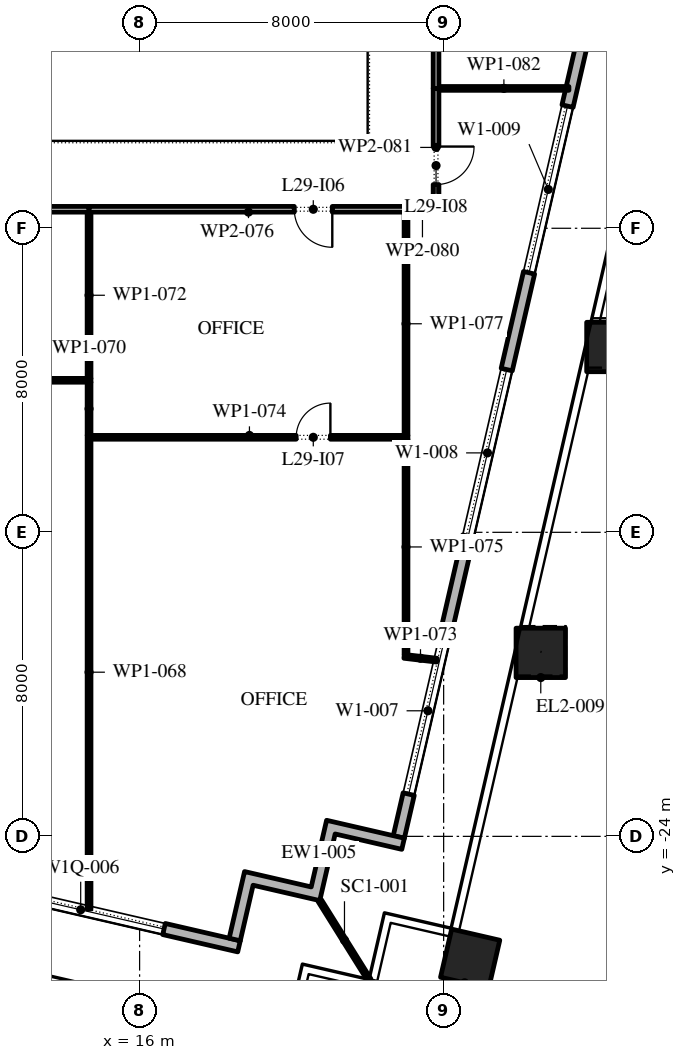
"""IFC4 building model, lengths in metres.
Left out: names, types, materials, properties, quantities, classifications, styles, units other than length and angle.
Written with IfcOpenShell. Run it as: python <this file> out.ifc"""

import sys

from ifc_helpers import new_model, si_unit, direction, frame, frame_2d, origin, origin_2d, place, context, subcontext, project, spatial, polyline, rectangle, outline, extrude, element, fill, save


model = new_model("IFC4")
c1 = context("Model", 3, precision=1e-05, world=origin(), true_north=direction((0.0, 1.0)))
c2 = subcontext(c1, "Body", "Model", "MODEL_VIEW")
j1 = project(units=[si_unit("LENGTHUNIT", "METRE"), si_unit("PLANEANGLEUNIT", "RADIAN")], contexts=[c1])
p1 = place(None, origin())
s1 = spatial("IfcSite", under=j1, at=p1, CompositionType="ELEMENT")
p2 = place(p1, origin())
s2 = spatial("IfcBuilding", under=s1, at=p2, CompositionType="ELEMENT")
p3 = place(p2, frame((0.0, 0.0, 135.0)))
s3 = spatial("IfcBuildingStorey", under=s2, at=p3, CompositionType="ELEMENT", Elevation=135.0)
p4 = place(p3, frame((24.698, -27.22, 0.0), z_axis=(0.0, 0.0, 1.0), x_axis=(0.974370064785, -0.224951054344, 0.0)))
e1 = element("IfcColumn", 1, at=p4, inside=s3, PredefinedType="COLUMN", context=c2, shape_type="SweptSolid", body=[
    extrude(rectangle(XDim=1.3, YDim=1.3, at=origin_2d()), origin(), (0.0, 0.0, 1.0), 4.2),
])
p5 = place(p3, frame((26.556, -19.172, 0.0), z_axis=(0.002964348167, 0.012671135303, 0.9999153239), x_axis=(-0.973709261374, 0.227794368487, 0.0)))
e2 = element("IfcColumn", 2, at=p5, inside=s3, PredefinedType="COLUMN", context=c2, shape_type="SweptSolid", body=[
    extrude(rectangle(XDim=1.3, YDim=1.3, at=origin_2d()), origin(), (0.0, 0.0, 1.0), 4.2),
])
p6 = place(p3, frame((28.414, -11.124, 0.0), z_axis=(0.005810983994, 0.025277780376, 0.999663576552), x_axis=(-0.974579651079, 0.224041299099, 0.0)))
e3 = element("IfcColumn", 3, at=p6, inside=s3, PredefinedType="COLUMN", context=c2, shape_type="SweptSolid", body=[
    extrude(rectangle(XDim=1.3, YDim=1.3, at=origin_2d()), origin(), (0.0, 0.0, 1.0), 4.201),
])
p7 = place(p3, frame((22.539, -28.569, 0.0), z_axis=(0.0, 0.0, 1.0), x_axis=(0.974370064785, -0.224951054344, 0.0)))
e4 = element("IfcColumn", 4, at=p7, inside=s3, PredefinedType="COLUMN", context=c2, shape_type="SweptSolid", body=[
    extrude(rectangle(XDim=1.3, YDim=1.3, at=origin_2d()), origin(), (0.0, 0.0, 1.0), 4.2),
])
p8 = place(p3, frame((-31.078, -15.421, 0.0), z_axis=(0.0, 0.0, 1.0), x_axis=(0.974370456532, -0.224949357493, 0.0)))
e5 = element("IfcWall", 5, at=p8, inside=s3, PredefinedType="STANDARD", context=c2, shape_type="SweptSolid", body=[
    extrude(rectangle(XDim=51.0, YDim=0.3, at=frame_2d((25.5, 0.0))), origin(), (0.0, 0.0, 1.0), 4.0),
])
p9 = place(p8, frame((1.875, 0.0, 0.45)))
e6 = element("IfcOpeningElement", 6, at=p9, cuts=e5, PredefinedType="OPENING", context=c2, shape_type="SweptSolid", body=[
    extrude(rectangle(XDim=4.5, YDim=2.575, at=frame_2d((2.25, 1.288))), frame((0.0, 0.16, 0.0), z_axis=(0.0, -1.0, 0.0), x_axis=(1.0, 0.0, 0.0)), (0.0, 0.0, 1.0), 0.32),
])
p10 = place(p8, frame((10.275, 0.0, 0.45)))
e7 = element("IfcOpeningElement", 7, at=p10, cuts=e5, PredefinedType="OPENING", context=c2, shape_type="SweptSolid", body=[
    extrude(rectangle(XDim=4.5, YDim=2.525, at=frame_2d((2.25, 1.262))), frame((0.0, 0.16, 0.0), z_axis=(0.0, -1.0, 0.0), x_axis=(1.0, 0.0, 0.0)), (0.0, 0.0, 1.0), 0.32),
])
p11 = place(p8, frame((18.825, 0.0, 0.45)))
e8 = element("IfcOpeningElement", 8, at=p11, cuts=e5, PredefinedType="OPENING", context=c2, shape_type="SweptSolid", body=[
    extrude(rectangle(XDim=4.5, YDim=2.5, at=frame_2d((2.25, 1.25))), frame((0.0, 0.16, 0.0), z_axis=(0.0, -1.0, 0.0), x_axis=(1.0, 0.0, 0.0)), (0.0, 0.0, 1.0), 0.32),
])
p12 = place(p8, frame((28.425, 0.0, 0.0)))
e9 = element("IfcOpeningElement", 9, at=p12, cuts=e5, PredefinedType="OPENING", context=c2, shape_type="SweptSolid", body=[
    extrude(rectangle(XDim=2.4, YDim=2.9, at=frame_2d((1.2, 1.45))), frame((0.0, 0.16, 0.0), z_axis=(0.0, -1.0, 0.0), x_axis=(1.0, 0.0, 0.0)), (0.0, 0.0, 1.0), 0.32),
])
p13 = place(p8, frame((35.925, 0.0, 0.45)))
e10 = element("IfcOpeningElement", 10, at=p13, cuts=e5, PredefinedType="OPENING", context=c2, shape_type="SweptSolid", body=[
    extrude(rectangle(XDim=4.5, YDim=2.45, at=frame_2d((2.25, 1.225))), frame((0.0, 0.16, 0.0), z_axis=(0.0, -1.0, 0.0), x_axis=(1.0, 0.0, 0.0)), (0.0, 0.0, 1.0), 0.32),
])
p14 = place(p8, frame((44.475, 0.0, 0.45)))
e11 = element("IfcOpeningElement", 11, at=p14, cuts=e5, PredefinedType="OPENING", context=c2, shape_type="SweptSolid", body=[
    extrude(rectangle(XDim=4.5, YDim=2.45, at=frame_2d((2.25, 1.225))), frame((0.0, 0.16, 0.0), z_axis=(0.0, -1.0, 0.0), x_axis=(1.0, 0.0, 0.0)), (0.0, 0.0, 1.0), 0.32),
])
p15 = place(p3, frame((22.82, -24.016, 0.0), z_axis=(0.0, 0.0, 1.0), x_axis=(0.224953880882, 0.974369412223, 0.0)))
e12 = element("IfcWall", 12, at=p15, inside=s3, PredefinedType="STANDARD", context=c2, shape_type="SweptSolid", body=[
    extrude(rectangle(XDim=49.5, YDim=0.3, at=frame_2d((24.75, 0.0))), origin(), (0.0, 0.0, 1.0), 4.0),
])
p16 = place(p15, frame((1.157, 0.0, 0.45)))
e13 = element("IfcOpeningElement", 13, at=p16, cuts=e12, PredefinedType="OPENING", context=c2, shape_type="SweptSolid", body=[
    extrude(rectangle(XDim=4.5, YDim=3.05, at=frame_2d((2.25, 1.525))), frame((0.0, 0.16, 0.0), z_axis=(0.0, -1.0, 0.0), x_axis=(1.0, 0.0, 0.0)), (0.0, 0.0, 1.0), 0.32),
])
p17 = place(p15, frame((8.121, 0.0, 0.45)))
e14 = element("IfcOpeningElement", 14, at=p17, cuts=e12, PredefinedType="OPENING", context=c2, shape_type="SweptSolid", body=[
    extrude(rectangle(XDim=4.5, YDim=3.05, at=frame_2d((2.25, 1.525))), frame((0.0, 0.16, 0.0), z_axis=(0.0, -1.0, 0.0), x_axis=(1.0, 0.0, 0.0)), (0.0, 0.0, 1.0), 0.32),
])
p18 = place(p15, frame((15.236, 0.0, 0.45)))
e15 = element("IfcOpeningElement", 15, at=p18, cuts=e12, PredefinedType="OPENING", context=c2, shape_type="SweptSolid", body=[
    extrude(rectangle(XDim=4.5, YDim=3.05, at=frame_2d((2.25, 1.525))), frame((0.0, 0.16, 0.0), z_axis=(0.0, -1.0, 0.0), x_axis=(1.0, 0.0, 0.0)), (0.0, 0.0, 1.0), 0.32),
])
p19 = place(p15, frame((23.4, 0.0, 0.0)))
e16 = element("IfcOpeningElement", 16, at=p19, cuts=e12, PredefinedType="OPENING", context=c2, shape_type="SweptSolid", body=[
    extrude(rectangle(XDim=2.4, YDim=3.5, at=frame_2d((1.2, 1.75))), frame((0.0, 0.16, 0.0), z_axis=(0.0, -1.0, 0.0), x_axis=(1.0, 0.0, 0.0)), (0.0, 0.0, 1.0), 0.32),
])
p20 = place(p15, frame((29.464, 0.0, 0.45)))
e17 = element("IfcOpeningElement", 17, at=p20, cuts=e12, PredefinedType="OPENING", context=c2, shape_type="SweptSolid", body=[
    extrude(rectangle(XDim=4.5, YDim=2.875, at=frame_2d((2.25, 1.438))), frame((0.0, 0.16, 0.0), z_axis=(0.0, -1.0, 0.0), x_axis=(1.0, 0.0, 0.0)), (0.0, 0.0, 1.0), 0.32),
])
p21 = place(p15, frame((36.579, 0.0, 0.45)))
e18 = element("IfcOpeningElement", 18, at=p21, cuts=e12, PredefinedType="OPENING", context=c2, shape_type="SweptSolid", body=[
    extrude(rectangle(XDim=4.5, YDim=2.825, at=frame_2d((2.25, 1.413))), frame((0.0, 0.16, 0.0), z_axis=(0.0, -1.0, 0.0), x_axis=(1.0, 0.0, 0.0)), (0.0, 0.0, 1.0), 0.32),
])
p22 = place(p15, frame((43.693, 0.0, 0.45)))
e19 = element("IfcOpeningElement", 19, at=p22, cuts=e12, PredefinedType="OPENING", context=c2, shape_type="SweptSolid", body=[
    extrude(rectangle(XDim=4.5, YDim=2.75, at=frame_2d((2.25, 1.375))), frame((0.0, 0.16, 0.0), z_axis=(0.0, -1.0, 0.0), x_axis=(1.0, 0.0, 0.0)), (0.0, 0.0, 1.0), 0.32),
])
p23 = place(p3, origin())
e20 = element("IfcWall", 20, at=p23, inside=s3, PredefinedType="STANDARD", context=c2, shape_type="SweptSolid", body=[
    extrude(outline(polyline([(20.515, -25.331), (20.92, -23.577), (22.967, -24.049), (22.899, -24.342), (21.145, -23.937), (20.74, -25.691), (18.986, -25.286), (18.649, -26.747), (18.357, -26.68), (18.762, -24.926), (20.515, -25.331)])), origin(), (0.0, 0.0, 1.0), 4.0),
])
p24 = place(p3, frame((20.74, -25.691, -0.05), z_axis=(0.0, 0.0, 1.0), x_axis=(0.529972121605, -0.848015064914, 0.0)))
e21 = element("IfcWall", 21, at=p24, inside=s3, PredefinedType="STANDARD", context=c2, shape_type="SweptSolid", body=[
    extrude(rectangle(XDim=2.455, YDim=0.1, at=frame_2d((1.228, 0.0))), origin(), (0.0, 0.0, 1.0), 4.05),
])
p25 = place(p3, frame((14.67, -13.45, 0.0), z_axis=(0.0, 0.0, 1.0), x_axis=(0.0, -1.0, 0.0)))
e22 = element("IfcWall", 22, at=p25, inside=s3, PredefinedType="PARTITIONING", context=c2, shape_type="SweptSolid", body=[
    extrude(rectangle(XDim=12.461, YDim=0.1, at=frame_2d((6.23, 0.0))), origin(), (0.0, 0.0, 1.0), 4.0),
])
p26 = place(p3, frame((14.72, -12.0, 0.0), z_axis=(0.0, 0.0, 1.0), x_axis=(-1.0, 0.0, 0.0)))
e23 = element("IfcWall", 23, at=p26, inside=s3, PredefinedType="PARTITIONING", context=c2, shape_type="SweptSolid", body=[
    extrude(rectangle(XDim=12.68, YDim=0.1, at=frame_2d((6.34, 0.0))), origin(), (0.0, 0.0, 1.0), 4.0),
])
p27 = place(p26, frame((5.88, 0.0, 0.0)))
e24 = element("IfcOpeningElement", 24, at=p27, cuts=e23, PredefinedType="OPENING", context=c2, shape_type="SweptSolid", body=[
    extrude(rectangle(XDim=0.9, YDim=2.1, at=frame_2d((0.45, 1.05))), frame((0.0, 0.06, 0.0), z_axis=(0.0, -1.0, 0.0), x_axis=(1.0, 0.0, 0.0)), (0.0, 0.0, 1.0), 0.12),
])
p28 = place(p3, frame((14.67, -12.05, 0.0), z_axis=(0.0, 0.0, 1.0), x_axis=(0.0, -1.0, 0.0)))
e25 = element("IfcWall", 25, at=p28, inside=s3, PredefinedType="PARTITIONING", context=c2, shape_type="SweptSolid", body=[
    extrude(rectangle(XDim=1.4, YDim=0.1, at=frame_2d((0.7, 0.0))), origin(), (0.0, 0.0, 1.0), 4.0),
])
p29 = place(p3, frame((14.67, -7.5, 0.0), z_axis=(0.0, 0.0, 1.0), x_axis=(-1.0, 0.0, 0.0)))
e26 = element("IfcWall", 26, at=p29, inside=s3, PredefinedType="PARTITIONING", context=c2, shape_type="SweptSolid", body=[
    extrude(rectangle(XDim=6.395, YDim=0.15, at=frame_2d((3.198, 0.0))), origin(), (0.0, 0.0, 1.0), 4.0),
])
p30 = place(p29, frame((2.82, 0.0, 0.0)))
e27 = element("IfcOpeningElement", 27, at=p30, cuts=e26, PredefinedType="OPENING", context=c2, shape_type="SweptSolid", body=[
    extrude(rectangle(XDim=1.0, YDim=2.1, at=frame_2d((0.5, 1.05))), frame((0.0, 0.085, 0.0), z_axis=(0.0, -1.0, 0.0), x_axis=(1.0, 0.0, 0.0)), (0.0, 0.0, 1.0), 0.17),
])
p31 = place(p3, frame((14.67, -7.575, 0.0), z_axis=(0.0, 0.0, 1.0), x_axis=(0.0, -1.0, 0.0)))
e28 = element("IfcWall", 28, at=p31, inside=s3, PredefinedType="PARTITIONING", context=c2, shape_type="SweptSolid", body=[
    extrude(rectangle(XDim=4.375, YDim=0.1, at=frame_2d((2.188, 0.0))), origin(), (0.0, 0.0, 1.0), 4.0),
])
p32 = place(p3, frame((22.96, -19.264, 0.0), z_axis=(0.0, 0.0, 1.0), x_axis=(0.993326131588, -0.115339482852, 0.0)))
e29 = element("IfcWall", 29, at=p32, inside=s3, PredefinedType="PARTITIONING", context=c2, shape_type="SweptSolid", body=[
    extrude(rectangle(XDim=0.868, YDim=0.1, at=frame_2d((0.434, 0.0))), origin(), (0.0, 0.0, 1.0), 4.0),
])
p33 = place(p3, frame((23.06, -13.5, 0.0), z_axis=(0.0, 0.0, 1.0), x_axis=(-1.0, 0.0, 0.0)))
e30 = element("IfcWall", 30, at=p33, inside=s3, PredefinedType="PARTITIONING", context=c2, shape_type="SweptSolid", body=[
    extrude(rectangle(XDim=8.34, YDim=0.1, at=frame_2d((4.17, 0.0))), origin(), (0.0, 0.0, 1.0), 4.0),
])
p34 = place(p33, frame((2.04, 0.0, 0.0)))
e31 = element("IfcOpeningElement", 31, at=p34, cuts=e30, PredefinedType="OPENING", context=c2, shape_type="SweptSolid", body=[
    extrude(rectangle(XDim=0.9, YDim=2.1, at=frame_2d((0.45, 1.05))), frame((0.0, 0.06, 0.0), z_axis=(0.0, -1.0, 0.0), x_axis=(1.0, 0.0, 0.0)), (0.0, 0.0, 1.0), 0.12),
])
p35 = place(p3, frame((23.01, -13.55, 0.0), z_axis=(0.0, 0.0, 1.0), x_axis=(0.0, -1.0, 0.0)))
e32 = element("IfcWall", 32, at=p35, inside=s3, PredefinedType="PARTITIONING", context=c2, shape_type="SweptSolid", body=[
    extrude(rectangle(XDim=5.67, YDim=0.1, at=frame_2d((2.835, 0.0))), origin(), (0.0, 0.0, 1.0), 4.0),
])
p36 = place(p3, frame((23.06, -7.5, 0.0), z_axis=(0.0, 0.0, 1.0), x_axis=(-1.0, 0.0, 0.0)))
e33 = element("IfcWall", 33, at=p36, inside=s3, PredefinedType="PARTITIONING", context=c2, shape_type="SweptSolid", body=[
    extrude(rectangle(XDim=8.39, YDim=0.15, at=frame_2d((4.195, 0.0))), origin(), (0.0, 0.0, 1.0), 4.0),
])
p37 = place(p36, frame((1.99, 0.0, 0.0)))
e34 = element("IfcOpeningElement", 34, at=p37, cuts=e33, PredefinedType="OPENING", context=c2, shape_type="SweptSolid", body=[
    extrude(rectangle(XDim=1.0, YDim=2.1, at=frame_2d((0.5, 1.05))), frame((0.0, 0.085, 0.0), z_axis=(0.0, -1.0, 0.0), x_axis=(1.0, 0.0, 0.0)), (0.0, 0.0, 1.0), 0.17),
])
p38 = place(p3, frame((23.01, -7.575, 0.0), z_axis=(0.0, 0.0, 1.0), x_axis=(0.0, -1.0, 0.0)))
e35 = element("IfcWall", 35, at=p38, inside=s3, PredefinedType="PARTITIONING", context=c2, shape_type="SweptSolid", body=[
    extrude(rectangle(XDim=5.875, YDim=0.1, at=frame_2d((2.938, 0.0))), origin(), (0.0, 0.0, 1.0), 4.0),
])
p39 = place(p3, frame((23.875, -7.5, 0.0), z_axis=(0.0, 0.0, 1.0), x_axis=(-1.0, 0.0, 0.0)))
e36 = element("IfcWall", 36, at=p39, inside=s3, PredefinedType="PARTITIONING", context=c2, shape_type="SweptSolid", body=[
    extrude(rectangle(XDim=0.865, YDim=0.15, at=frame_2d((0.433, 0.0))), origin(), (0.0, 0.0, 1.0), 4.0),
])
p40 = place(p3, frame((23.8, -4.32, 0.0), z_axis=(0.0, 0.0, 1.0), x_axis=(0.0, -1.0, 0.0)))
e37 = element("IfcWall", 37, at=p40, inside=s3, PredefinedType="PARTITIONING", context=c2, shape_type="SweptSolid", body=[
    extrude(rectangle(XDim=3.105, YDim=0.15, at=frame_2d((1.552, 0.0))), origin(), (0.0, 0.0, 1.0), 4.0),
])
p41 = place(p40, frame((1.53, 0.0, 0.0)))
e38 = element("IfcOpeningElement", 38, at=p41, cuts=e37, PredefinedType="OPENING", context=c2, shape_type="SweptSolid", body=[
    extrude(rectangle(XDim=1.0, YDim=2.1, at=frame_2d((0.5, 1.05))), frame((0.0, 0.085, 0.0), z_axis=(0.0, -1.0, 0.0), x_axis=(1.0, 0.0, 0.0)), (0.0, 0.0, 1.0), 0.17),
])
p42 = place(p3, frame((23.875, -4.32, 0.0), z_axis=(0.0, 0.0, 1.0), x_axis=(1.0, 0.0, 0.0)))
e39 = element("IfcWall", 39, at=p42, inside=s3, PredefinedType="PARTITIONING", context=c2, shape_type="SweptSolid", body=[
    extrude(rectangle(XDim=3.421, YDim=0.1, at=frame_2d((1.71, 0.0))), origin(), (0.0, 0.0, 1.0), 4.0),
])
p43 = place(p3, frame((23.8, 10.44, 0.0), z_axis=(0.0, 0.0, 1.0), x_axis=(0.0, -1.0, 0.0)))
e40 = element("IfcWall", 40, at=p43, inside=s3, PredefinedType="PARTITIONING", context=c2, shape_type="SweptSolid", body=[
    extrude(rectangle(XDim=14.76, YDim=0.15, at=frame_2d((7.38, 0.0))), origin(), (0.0, 0.0, 1.0), 4.0),
])
p44 = place(p43, frame((9.86, 0.0, 0.0)))
e41 = element("IfcOpeningElement", 41, at=p44, cuts=e40, PredefinedType="OPENING", context=c2, shape_type="SweptSolid", body=[
    extrude(rectangle(XDim=1.0, YDim=2.1, at=frame_2d((0.5, 1.05))), frame((0.0, 0.085, 0.0), z_axis=(0.0, -1.0, 0.0), x_axis=(1.0, 0.0, 0.0)), (0.0, 0.0, 1.0), 0.17),
])
p45 = place(p14, origin())
e42 = element("IfcWindow", 42, at=p45, inside=s3, PartitioningType="DOUBLE_PANEL_VERTICAL", PredefinedType="WINDOW", context=c2, shape_type="SweptSolid", body=[
    extrude(rectangle(XDim=4.5, YDim=2.45, at=frame_2d((2.25, 1.225))), frame((0.0, 0.03, 0.0), z_axis=(0.0, -1.0, 0.0), x_axis=(1.0, 0.0, 0.0)), (0.0, 0.0, 1.0), 0.06),
])
fill(e11, e42)
p46 = place(p16, origin())
e43 = element("IfcWindow", 43, at=p46, inside=s3, PartitioningType="DOUBLE_PANEL_VERTICAL", PredefinedType="WINDOW", context=c2, shape_type="SweptSolid", body=[
    extrude(rectangle(XDim=4.5, YDim=3.05, at=frame_2d((2.25, 1.525))), frame((0.0, 0.03, 0.0), z_axis=(0.0, -1.0, 0.0), x_axis=(1.0, 0.0, 0.0)), (0.0, 0.0, 1.0), 0.06),
])
fill(e13, e43)
p47 = place(p17, origin())
e44 = element("IfcWindow", 44, at=p47, inside=s3, PartitioningType="DOUBLE_PANEL_VERTICAL", PredefinedType="WINDOW", context=c2, shape_type="SweptSolid", body=[
    extrude(rectangle(XDim=4.5, YDim=3.05, at=frame_2d((2.25, 1.525))), frame((0.0, 0.03, 0.0), z_axis=(0.0, -1.0, 0.0), x_axis=(1.0, 0.0, 0.0)), (0.0, 0.0, 1.0), 0.06),
])
fill(e14, e44)
p48 = place(p18, origin())
e45 = element("IfcWindow", 45, at=p48, inside=s3, PartitioningType="DOUBLE_PANEL_VERTICAL", PredefinedType="WINDOW", context=c2, shape_type="SweptSolid", body=[
    extrude(rectangle(XDim=4.5, YDim=3.05, at=frame_2d((2.25, 1.525))), frame((0.0, 0.03, 0.0), z_axis=(0.0, -1.0, 0.0), x_axis=(1.0, 0.0, 0.0)), (0.0, 0.0, 1.0), 0.06),
])
fill(e15, e45)
p49 = place(p37, origin())
e46 = element("IfcDoor", 46, at=p49, inside=s3, OperationType="SINGLE_SWING_RIGHT", PredefinedType="DOOR", context=c2, shape_type="SweptSolid", body=[
    extrude(rectangle(XDim=1.0, YDim=2.1, at=frame_2d((0.5, 1.05))), frame((0.0, 0.025, 0.0), z_axis=(0.0, -1.0, 0.0), x_axis=(1.0, 0.0, 0.0)), (0.0, 0.0, 1.0), 0.05),
])
fill(e34, e46)
p50 = place(p34, frame((0.9, 0.0, 0.0), z_axis=(0.0, 0.0, 1.0), x_axis=(-1.0, 0.0, 0.0)))
e47 = element("IfcDoor", 47, at=p50, inside=s3, OperationType="SINGLE_SWING_LEFT", PredefinedType="DOOR", context=c2, shape_type="SweptSolid", body=[
    extrude(rectangle(XDim=0.9, YDim=2.1, at=frame_2d((0.45, 1.05))), frame((0.0, 0.025, 0.0), z_axis=(0.0, -1.0, 0.0), x_axis=(1.0, 0.0, 0.0)), (0.0, 0.0, 1.0), 0.05),
])
fill(e31, e47)
p51 = place(p41, origin())
e48 = element("IfcDoor", 48, at=p51, inside=s3, OperationType="SINGLE_SWING_RIGHT", PredefinedType="DOOR", context=c2, shape_type="SweptSolid", body=[
    extrude(rectangle(XDim=1.0, YDim=2.1, at=frame_2d((0.5, 1.05))), frame((0.0, 0.025, 0.0), z_axis=(0.0, -1.0, 0.0), x_axis=(1.0, 0.0, 0.0)), (0.0, 0.0, 1.0), 0.05),
])
fill(e38, e48)
save(model, sys.argv[1])
